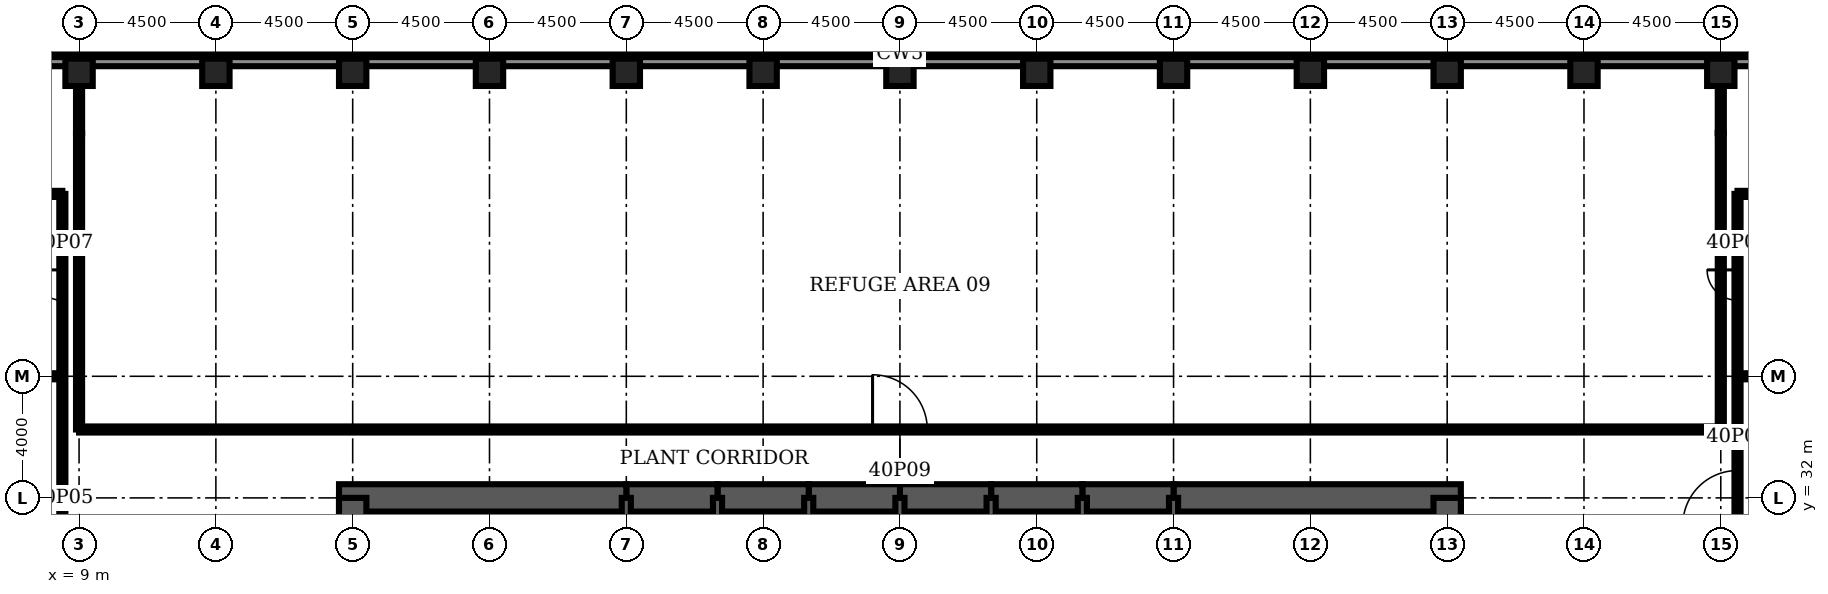
"""IFC4 building model, lengths in metres.
Left out: names, types, materials, properties, quantities, classifications, styles, units other than length and angle.
Written with IfcOpenShell. Run it as: python <this file> out.ifc"""

import sys

from ifc_helpers import new_model, si_unit, direction, frame, frame_2d, origin, origin_2d, place, context, subcontext, project, spatial, rectangle, hollow_rectangle, extrude, element, fill, save


model = new_model("IFC4")
c1 = context("Model", 3, precision=1e-05, world=origin(), true_north=direction((0.0, 1.0)))
c2 = subcontext(c1, "Body", "Model", "MODEL_VIEW")
j1 = project(units=[si_unit("LENGTHUNIT", "METRE"), si_unit("PLANEANGLEUNIT", "RADIAN")], contexts=[c1])
p1 = place(None, origin())
s1 = spatial("IfcSite", under=j1, at=p1, CompositionType="ELEMENT")
p2 = place(p1, origin())
s2 = spatial("IfcBuilding", under=s1, at=p2, CompositionType="ELEMENT")
p3 = place(p2, frame((0.0, 0.0, 180.3)))
s3 = spatial("IfcBuildingStorey", under=s2, at=p3, CompositionType="ELEMENT", Elevation=180.3)
for number, where, z_axis, x_axis in (
    (1, (63.0, 45.944, 0.155), (0.0, -0.342, 0.94), (0.0, 0.94, 0.342)),
    (2, (58.5, 45.944, 0.155), (0.0, -0.342, 0.94), (0.0, 0.94, 0.342)),
    (3, (54.0, 45.944, 0.155), (0.0, -0.342, 0.94), (0.0, 0.94, 0.342)),
    (4, (49.5, 45.944, 0.155), (0.0, -0.342, 0.94), (0.0, 0.94, 0.342)),
    (5, (45.0, 45.944, 0.155), (0.0, -0.342, 0.94), (0.0, 0.94, 0.342)),
    (6, (40.5, 45.944, 0.155), (0.0, -0.342, 0.94), (0.0, 0.94, 0.342)),
    (7, (36.0, 45.944, 0.155), (0.0, -0.342, 0.94), (0.0, 0.94, 0.342)),
    (8, (31.5, 45.944, 0.155), (0.0, -0.342, 0.94), (0.0, 0.94, 0.342)),
    (9, (27.0, 45.944, 0.155), (0.0, -0.342, 0.94), (0.0, 0.94, 0.342)),
    (10, (22.5, 45.944, 0.155), (0.0, -0.342, 0.94), (0.0, 0.94, 0.342)),
    (11, (18.0, 45.944, 0.155), (0.0, -0.342, 0.94), (0.0, 0.94, 0.342)),
    (12, (13.5, 45.944, 0.155), (0.0, -0.342, 0.94), (0.0, 0.94, 0.342)),
    (13, (9.0, 45.944, 0.155), (0.0, -0.342, 0.94), (0.0, 0.94, 0.342)),
):
    element("IfcColumn", number, at=place(p3, frame(where, z_axis=z_axis, x_axis=x_axis)), inside=s3, PredefinedType="USERDEFINED", context=c2, shape_type="SweptSolid", body=[
        extrude(hollow_rectangle(XDim=0.9, YDim=0.9, WallThickness=0.09, at=origin_2d()), origin(), (0.0, 0.0, 1.0), 5.522),
    ])
p4 = place(p3, frame((54.45, 32.0, 0.0), z_axis=(0.0, 0.0, 1.0), x_axis=(-1.0, 0.0, 0.0)))
e14 = element("IfcWall", 14, at=p4, inside=s3, PredefinedType="SHEAR", context=c2, shape_type="SweptSolid", body=[
    extrude(rectangle(XDim=9.45, YDim=0.9, at=frame_2d((4.725, 0.0))), origin(), (0.0, 0.0, 1.0), 5.5),
])
for number, where, z_axis, x_axis in (
    (15, (45.0, 32.0, 0.0), (0.0, 0.0, 1.0), (-1.0, 0.0, 0.0)),
    (16, (42.0, 32.0, 0.0), (0.0, 0.0, 1.0), (-1.0, 0.0, 0.0)),
    (17, (39.0, 32.0, 0.0), (0.0, 0.0, 1.0), (-1.0, 0.0, 0.0)),
    (18, (36.0, 32.0, 0.0), (0.0, 0.0, 1.0), (-1.0, 0.0, 0.0)),
    (19, (33.0, 32.0, 0.0), (0.0, 0.0, 1.0), (-1.0, 0.0, 0.0)),
    (20, (30.0, 32.0, 0.0), (0.0, 0.0, 1.0), (-1.0, 0.0, 0.0)),
):
    element("IfcWall", number, at=place(p3, frame(where, z_axis=z_axis, x_axis=x_axis)), inside=s3, PredefinedType="SHEAR", context=c2, shape_type="SweptSolid", body=[
        extrude(rectangle(XDim=3.0, YDim=0.9, at=frame_2d((1.5, 0.0))), origin(), (0.0, 0.0, 1.0), 5.5),
    ])
p5 = place(p3, frame((27.0, 32.0, 0.0), z_axis=(0.0, 0.0, 1.0), x_axis=(-1.0, 0.0, 0.0)))
e21 = element("IfcWall", 21, at=p5, inside=s3, PredefinedType="SHEAR", context=c2, shape_type="SweptSolid", body=[
    extrude(rectangle(XDim=9.45, YDim=0.9, at=frame_2d((4.725, 0.0))), origin(), (0.0, 0.0, 1.0), 5.5),
])
for number, where, z_axis, x_axis in (
    (22, (18.0, 32.0, 0.0), (0.0, 0.0, 1.0), (0.0, -1.0, 0.0)),
    (23, (54.0, 28.8, 0.0), (0.0, 0.0, 1.0), (0.0, 1.0, 0.0)),
):
    element("IfcWall", number, at=place(p3, frame(where, z_axis=z_axis, x_axis=x_axis)), inside=s3, PredefinedType="SHEAR", context=c2, shape_type="SweptSolid", body=[
        extrude(rectangle(XDim=3.2, YDim=0.9, at=frame_2d((1.6, 0.0))), origin(), (0.0, 0.0, 1.0), 5.5),
    ])
for number, where, z_axis, x_axis in (
    (24, (27.0, 28.8, 0.0), (0.0, 0.0, 1.0), (0.0, 1.0, 0.0)),
    (25, (30.0, 28.8, 0.0), (0.0, 0.0, 1.0), (0.0, 1.0, 0.0)),
    (26, (33.0, 28.8, 0.0), (0.0, 0.0, 1.0), (0.0, 1.0, 0.0)),
    (27, (36.0, 28.8, 0.0), (0.0, 0.0, 1.0), (0.0, 1.0, 0.0)),
    (28, (39.0, 28.8, 0.0), (0.0, 0.0, 1.0), (0.0, 1.0, 0.0)),
    (29, (42.0, 28.8, 0.0), (0.0, 0.0, 1.0), (0.0, 1.0, 0.0)),
    (30, (45.0, 28.8, 0.0), (0.0, 0.0, 1.0), (0.0, 1.0, 0.0)),
):
    element("IfcWall", number, at=place(p3, frame(where, z_axis=z_axis, x_axis=x_axis)), inside=s3, PredefinedType="SOLIDWALL", context=c2, shape_type="SweptSolid", body=[
        extrude(rectangle(XDim=3.2, YDim=0.3, at=frame_2d((1.6, 0.0))), origin(), (0.0, 0.0, 1.0), 5.5),
    ])
p6 = place(p3, frame((9.0, 34.25, 0.0), z_axis=(0.0, 0.0, 1.0), x_axis=(1.0, 0.0, 0.0)))
e31 = element("IfcWall", 31, at=p6, inside=s3, PredefinedType="PARTITIONING", context=c2, shape_type="SweptSolid", body=[
    extrude(rectangle(XDim=54.0, YDim=0.2, at=frame_2d((27.0, 0.0))), origin(), (0.0, 0.0, 1.0), 5.34),
])
p7 = place(p6, frame((26.1, 0.0, 0.0)))
e32 = element("IfcOpeningElement", 32, at=p7, cuts=e31, PredefinedType="OPENING", context=c2, shape_type="SweptSolid", body=[
    extrude(rectangle(XDim=1.8, YDim=2.1, at=frame_2d((0.9, 1.05))), frame((0.0, 0.11, 0.0), z_axis=(0.0, -1.0, 0.0), x_axis=(1.0, 0.0, 0.0)), (0.0, 0.0, 1.0), 0.22),
])
for number, where, z_axis, x_axis in (
    (33, (0.45, 36.0, 0.0), (0.0, 0.0, 1.0), (1.0, 0.0, 0.0)),
    (34, (63.55, 36.0, 0.0), (0.0, 0.0, 1.0), (1.0, 0.0, 0.0)),
):
    element("IfcWall", number, at=place(p3, frame(where, z_axis=z_axis, x_axis=x_axis)), inside=s3, PredefinedType="PARTITIONING", context=c2, shape_type="SweptSolid", body=[
        extrude(rectangle(XDim=8.0, YDim=0.2, at=frame_2d((4.0, 0.0))), origin(), (0.0, 0.0, 1.0), 5.34),
    ])
for number, where, z_axis, x_axis in (
    (35, (4.5, 42.0, 0.0), (0.0, 0.0, 1.0), (1.0, 0.0, 0.0)),
    (36, (63.55, 42.0, 0.0), (0.0, 0.0, 1.0), (1.0, 0.0, 0.0)),
):
    element("IfcWall", number, at=place(p3, frame(where, z_axis=z_axis, x_axis=x_axis)), inside=s3, PredefinedType="PARTITIONING", context=c2, shape_type="SweptSolid", body=[
        extrude(rectangle(XDim=3.95, YDim=0.2, at=frame_2d((1.975, 0.0))), origin(), (0.0, 0.0, 1.0), 5.34),
    ])
p8 = place(p3, frame((8.45, 6.0, 0.0), z_axis=(0.0, 0.0, 1.0), x_axis=(0.0, 1.0, 0.0)))
e37 = element("IfcWall", 37, at=p8, inside=s3, PredefinedType="PARTITIONING", context=c2, shape_type="SweptSolid", body=[
    extrude(rectangle(XDim=36.0, YDim=0.2, at=frame_2d((18.0, 0.0))), origin(), (0.0, 0.0, 1.0), 5.34),
])
p9 = place(p8, frame((8.1, 0.0, 0.0)))
e38 = element("IfcOpeningElement", 38, at=p9, cuts=e37, PredefinedType="OPENING", context=c2, shape_type="SweptSolid", body=[
    extrude(rectangle(XDim=1.8, YDim=2.1, at=frame_2d((0.9, 1.05))), frame((0.0, 0.11, 0.0), z_axis=(0.0, -1.0, 0.0), x_axis=(1.0, 0.0, 0.0)), (0.0, 0.0, 1.0), 0.22),
])
p10 = place(p8, frame((23.1, 0.0, 0.0)))
e39 = element("IfcOpeningElement", 39, at=p10, cuts=e37, PredefinedType="OPENING", context=c2, shape_type="SweptSolid", body=[
    extrude(rectangle(XDim=1.8, YDim=2.1, at=frame_2d((0.9, 1.05))), frame((0.0, 0.11, 0.0), z_axis=(0.0, -1.0, 0.0), x_axis=(1.0, 0.0, 0.0)), (0.0, 0.0, 1.0), 0.22),
])
p11 = place(p8, frame((32.5, 0.0, 0.0)))
e40 = element("IfcOpeningElement", 40, at=p11, cuts=e37, PredefinedType="OPENING", context=c2, shape_type="SweptSolid", body=[
    extrude(rectangle(XDim=1.0, YDim=2.1, at=frame_2d((0.5, 1.05))), frame((0.0, 0.11, 0.0), z_axis=(0.0, -1.0, 0.0), x_axis=(1.0, 0.0, 0.0)), (0.0, 0.0, 1.0), 0.22),
])
p12 = place(p3, frame((9.0, 34.25, 0.0), z_axis=(0.0, 0.0, 1.0), x_axis=(0.0, 1.0, 0.0)))
e41 = element("IfcWall", 41, at=p12, inside=s3, PredefinedType="PARTITIONING", context=c2, shape_type="SweptSolid", body=[
    extrude(rectangle(XDim=9.75, YDim=0.2, at=frame_2d((4.875, 0.0))), origin(), (0.0, 0.0, 1.0), 5.25),
])
p13 = place(p3, frame((9.0, 44.0, 0.0), z_axis=(0.0, 0.0, 1.0), x_axis=(0.0, 1.0, 0.0)))
e42 = element("IfcWall", 42, at=p13, inside=s3, PredefinedType="PARTITIONING", context=c2, shape_type="SweptSolid", body=[
    extrude(rectangle(XDim=1.55, YDim=0.2, at=frame_2d((0.775, 0.0))), origin(), (0.0, 0.0, 1.0), 4.726),
])
p14 = place(p3, frame((63.0, 34.25, 0.0), z_axis=(0.0, 0.0, 1.0), x_axis=(0.0, 1.0, 0.0)))
e43 = element("IfcWall", 43, at=p14, inside=s3, PredefinedType="PARTITIONING", context=c2, shape_type="SweptSolid", body=[
    extrude(rectangle(XDim=9.75, YDim=0.2, at=frame_2d((4.875, 0.0))), origin(), (0.0, 0.0, 1.0), 5.25),
])
p15 = place(p3, frame((63.0, 44.0, 0.0), z_axis=(0.0, 0.0, 1.0), x_axis=(0.0, 1.0, 0.0)))
e44 = element("IfcWall", 44, at=p15, inside=s3, PredefinedType="PARTITIONING", context=c2, shape_type="SweptSolid", body=[
    extrude(rectangle(XDim=1.55, YDim=0.2, at=frame_2d((0.775, 0.0))), origin(), (0.0, 0.0, 1.0), 4.726),
])
p16 = place(p3, frame((63.55, 6.0, 0.0), z_axis=(0.0, 0.0, 1.0), x_axis=(0.0, 1.0, 0.0)))
e45 = element("IfcWall", 45, at=p16, inside=s3, PredefinedType="PARTITIONING", context=c2, shape_type="SweptSolid", body=[
    extrude(rectangle(XDim=36.0, YDim=0.2, at=frame_2d((18.0, 0.0))), origin(), (0.0, 0.0, 1.0), 5.34),
])
p17 = place(p16, frame((8.1, 0.0, 0.0)))
e46 = element("IfcOpeningElement", 46, at=p17, cuts=e45, PredefinedType="OPENING", context=c2, shape_type="SweptSolid", body=[
    extrude(rectangle(XDim=1.8, YDim=2.1, at=frame_2d((0.9, 1.05))), frame((0.0, 0.11, 0.0), z_axis=(0.0, -1.0, 0.0), x_axis=(1.0, 0.0, 0.0)), (0.0, 0.0, 1.0), 0.22),
])
p18 = place(p16, frame((19.5, 0.0, 0.0)))
e47 = element("IfcOpeningElement", 47, at=p18, cuts=e45, PredefinedType="OPENING", context=c2, shape_type="SweptSolid", body=[
    extrude(rectangle(XDim=1.0, YDim=2.1, at=frame_2d((0.5, 1.05))), frame((0.0, 0.11, 0.0), z_axis=(0.0, -1.0, 0.0), x_axis=(1.0, 0.0, 0.0)), (0.0, 0.0, 1.0), 0.22),
])
p19 = place(p16, frame((25.1, 0.0, 0.0)))
e48 = element("IfcOpeningElement", 48, at=p19, cuts=e45, PredefinedType="OPENING", context=c2, shape_type="SweptSolid", body=[
    extrude(rectangle(XDim=1.8, YDim=2.1, at=frame_2d((0.9, 1.05))), frame((0.0, 0.11, 0.0), z_axis=(0.0, -1.0, 0.0), x_axis=(1.0, 0.0, 0.0)), (0.0, 0.0, 1.0), 0.22),
])
p20 = place(p16, frame((32.5, 0.0, 0.0)))
e49 = element("IfcOpeningElement", 49, at=p20, cuts=e45, PredefinedType="OPENING", context=c2, shape_type="SweptSolid", body=[
    extrude(rectangle(XDim=1.0, YDim=2.1, at=frame_2d((0.5, 1.05))), frame((0.0, 0.11, 0.0), z_axis=(0.0, -1.0, 0.0), x_axis=(1.0, 0.0, 0.0)), (0.0, 0.0, 1.0), 0.22),
])
p21 = place(p3, frame((67.85, 46.35, 5.5), z_axis=(0.0, 0.0, 1.0), x_axis=(-1.0, 0.0, 0.0)))
e50 = element("IfcWall", 50, at=p21, inside=s3, PredefinedType="PARAPET", context=c2, shape_type="SweptSolid", body=[
    extrude(rectangle(XDim=63.7, YDim=0.3, at=frame_2d((31.85, 0.0))), origin(), (0.0, 0.0, 1.0), 1.1),
])
p22 = place(p19, origin())
e51 = element("IfcDoor", 51, at=p22, inside=s3, OperationType="SINGLE_SWING_LEFT", PredefinedType="DOOR", context=c2, shape_type="SweptSolid", body=[
    extrude(rectangle(XDim=1.8, YDim=2.1, at=frame_2d((0.9, 1.05))), frame((0.0, 0.025, 0.0), z_axis=(0.0, -1.0, 0.0), x_axis=(1.0, 0.0, 0.0)), (0.0, 0.0, 1.0), 0.05),
])
fill(e48, e51)
p23 = place(p11, origin())
e52 = element("IfcDoor", 52, at=p23, inside=s3, OperationType="SINGLE_SWING_RIGHT", PredefinedType="DOOR", context=c2, shape_type="SweptSolid", body=[
    extrude(rectangle(XDim=1.0, YDim=2.1, at=frame_2d((0.5, 1.05))), frame((0.0, 0.025, 0.0), z_axis=(0.0, -1.0, 0.0), x_axis=(1.0, 0.0, 0.0)), (0.0, 0.0, 1.0), 0.05),
])
fill(e40, e52)
p24 = place(p20, origin())
e53 = element("IfcDoor", 53, at=p24, inside=s3, OperationType="SINGLE_SWING_RIGHT", PredefinedType="DOOR", context=c2, shape_type="SweptSolid", body=[
    extrude(rectangle(XDim=1.0, YDim=2.1, at=frame_2d((0.5, 1.05))), frame((0.0, 0.025, 0.0), z_axis=(0.0, -1.0, 0.0), x_axis=(1.0, 0.0, 0.0)), (0.0, 0.0, 1.0), 0.05),
])
fill(e49, e53)
p25 = place(p7, origin())
e54 = element("IfcDoor", 54, at=p25, inside=s3, OperationType="SINGLE_SWING_LEFT", PredefinedType="DOOR", context=c2, shape_type="SweptSolid", body=[
    extrude(rectangle(XDim=1.8, YDim=2.1, at=frame_2d((0.9, 1.05))), frame((0.0, 0.025, 0.0), z_axis=(0.0, -1.0, 0.0), x_axis=(1.0, 0.0, 0.0)), (0.0, 0.0, 1.0), 0.05),
])
fill(e32, e54)
save(model, sys.argv[1])
